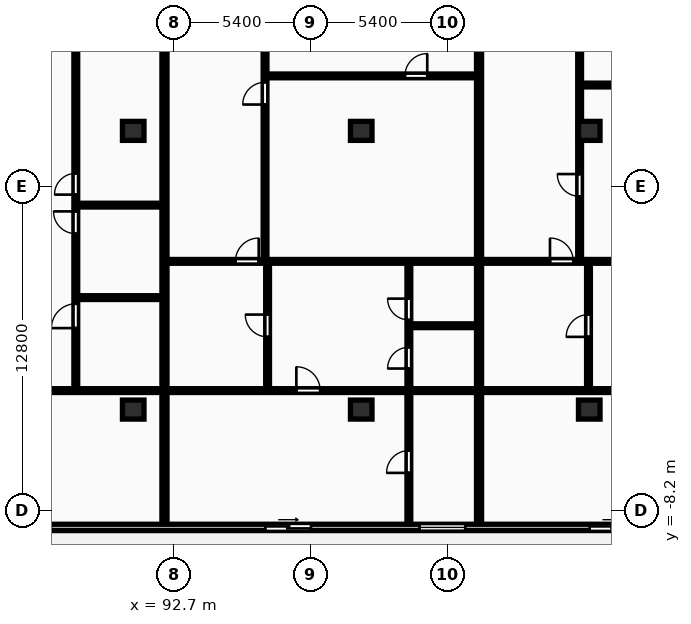
"""IFC4 building model, lengths in metres.
Left out: names, types, materials, properties, quantities, classifications, styles, units other than length and angle.
Written with IfcOpenShell. Run it as: python <this file> out.ifc"""

import sys

from ifc_helpers import new_model, si_unit, direction, frame, frame_2d, origin, origin_2d, place, context, subcontext, project, spatial, rectangle, extrude, element, fill, save


model = new_model("IFC4")
c1 = context("Model", 3, precision=1e-05, world=origin(), true_north=direction((0.0, 1.0)))
c2 = subcontext(c1, "Body", "Model", "MODEL_VIEW")
j1 = project(units=[si_unit("LENGTHUNIT", "METRE"), si_unit("PLANEANGLEUNIT", "RADIAN")], contexts=[c1])
p1 = place(None, origin())
s1 = spatial("IfcSite", under=j1, at=p1, CompositionType="ELEMENT")
p2 = place(p1, origin())
s2 = spatial("IfcBuilding", under=s1, at=p2, CompositionType="ELEMENT")
p3 = place(p2, frame((0.0, 0.0, 106.8)))
s3 = spatial("IfcBuildingStorey", under=s2, at=p3, CompositionType="ELEMENT", Elevation=106.8)
for number, where, z_axis, x_axis in (
    (1, (91.1, -4.2, 0.0), (0.0, 0.0, 1.0), (1.0, 0.0, 0.0)),
    (2, (91.1, 6.8, 0.0), (0.0, 0.0, 1.0), (1.0, 0.0, 0.0)),
    (3, (100.1, -4.2, 0.0), (0.0, 0.0, 1.0), (1.0, 0.0, 0.0)),
    (4, (100.1, 6.8, 0.0), (0.0, 0.0, 1.0), (1.0, 0.0, 0.0)),
    (5, (109.1, -4.2, 0.0), (0.0, 0.0, 1.0), (1.0, 0.0, 0.0)),
    (6, (109.1, 6.8, 0.0), (0.0, 0.0, 1.0), (1.0, 0.0, 0.0)),
):
    element("IfcColumn", number, at=place(p3, frame(where, z_axis=z_axis, x_axis=x_axis)), inside=s3, PredefinedType="COLUMN", context=c2, shape_type="SweptSolid", body=[
        extrude(rectangle(XDim=0.85, YDim=0.75, at=origin_2d()), origin(), (0.0, 0.0, 1.0), 3.25),
    ])
p4 = place(p3, frame((72.7, -8.85, 0.0), z_axis=(0.0, 0.0, 1.0), x_axis=(1.0, 0.0, 0.0)))
e7 = element("IfcWall", 7, at=p4, inside=s3, PredefinedType="STANDARD", context=c2, shape_type="SweptSolid", body=[
    extrude(rectangle(XDim=58.0, YDim=0.25, at=frame_2d((29.0, 0.0))), origin(), (0.0, 0.0, 1.0), 2.97),
])
p5 = place(p4, frame((3.358, 0.0, 0.0)))
e8 = element("IfcOpeningElement", 8, at=p5, cuts=e7, PredefinedType="OPENING", context=c2, shape_type="SweptSolid", body=[
    extrude(rectangle(XDim=1.8, YDim=2.2, at=frame_2d((0.9, 1.1))), frame((0.0, 0.135, 0.0), z_axis=(0.0, -1.0, 0.0), x_axis=(1.0, 0.0, 0.0)), (0.0, 0.0, 1.0), 0.27),
])
p6 = place(p4, frame((12.755, 0.0, 0.85)))
e9 = element("IfcOpeningElement", 9, at=p6, cuts=e7, PredefinedType="OPENING", context=c2, shape_type="SweptSolid", body=[
    extrude(rectangle(XDim=2.4, YDim=1.9, at=frame_2d((1.2, 0.95))), frame((0.0, 0.135, 0.0), z_axis=(0.0, -1.0, 0.0), x_axis=(1.0, 0.0, 0.0)), (0.0, 0.0, 1.0), 0.27),
])
p7 = place(p4, frame((23.617, 0.0, 0.0)))
e10 = element("IfcOpeningElement", 10, at=p7, cuts=e7, PredefinedType="OPENING", context=c2, shape_type="SweptSolid", body=[
    extrude(rectangle(XDim=1.8, YDim=2.2, at=frame_2d((0.9, 1.1))), frame((0.0, 0.135, 0.0), z_axis=(0.0, -1.0, 0.0), x_axis=(1.0, 0.0, 0.0)), (0.0, 0.0, 1.0), 0.27),
])
p8 = place(p4, frame((29.705, 0.0, 0.85)))
e11 = element("IfcOpeningElement", 11, at=p8, cuts=e7, PredefinedType="OPENING", context=c2, shape_type="SweptSolid", body=[
    extrude(rectangle(XDim=1.8, YDim=1.8, at=frame_2d((0.9, 0.9))), frame((0.0, 0.135, 0.0), z_axis=(0.0, -1.0, 0.0), x_axis=(1.0, 0.0, 0.0)), (0.0, 0.0, 1.0), 0.27),
])
p9 = place(p4, frame((36.417, 0.0, 0.0)))
e12 = element("IfcOpeningElement", 12, at=p9, cuts=e7, PredefinedType="OPENING", context=c2, shape_type="SweptSolid", body=[
    extrude(rectangle(XDim=1.8, YDim=2.2, at=frame_2d((0.9, 1.1))), frame((0.0, 0.135, 0.0), z_axis=(0.0, -1.0, 0.0), x_axis=(1.0, 0.0, 0.0)), (0.0, 0.0, 1.0), 0.27),
])
p10 = place(p4, frame((43.213, 0.0, 0.85)))
e13 = element("IfcOpeningElement", 13, at=p10, cuts=e7, PredefinedType="OPENING", context=c2, shape_type="SweptSolid", body=[
    extrude(rectangle(XDim=1.8, YDim=1.8, at=frame_2d((0.9, 0.9))), frame((0.0, 0.135, 0.0), z_axis=(0.0, -1.0, 0.0), x_axis=(1.0, 0.0, 0.0)), (0.0, 0.0, 1.0), 0.27),
])
p11 = place(p4, frame((49.262, 0.0, 0.0)))
e14 = element("IfcOpeningElement", 14, at=p11, cuts=e7, PredefinedType="OPENING", context=c2, shape_type="SweptSolid", body=[
    extrude(rectangle(XDim=1.8, YDim=2.2, at=frame_2d((0.9, 1.1))), frame((0.0, 0.135, 0.0), z_axis=(0.0, -1.0, 0.0), x_axis=(1.0, 0.0, 0.0)), (0.0, 0.0, 1.0), 0.27),
])
p12 = place(p4, frame((54.9, 0.0, 0.85)))
e15 = element("IfcOpeningElement", 15, at=p12, cuts=e7, PredefinedType="OPENING", context=c2, shape_type="SweptSolid", body=[
    extrude(rectangle(XDim=2.4, YDim=1.9, at=frame_2d((1.2, 0.95))), frame((0.0, 0.135, 0.0), z_axis=(0.0, -1.0, 0.0), x_axis=(1.0, 0.0, 0.0)), (0.0, 0.0, 1.0), 0.27),
])
p13 = place(p3, frame((92.333, -8.7, 0.0), z_axis=(0.0, 0.0, 1.0), x_axis=(0.0, 1.0, 0.0)))
e16 = element("IfcWall", 16, at=p13, inside=s3, PredefinedType="PARTITIONING", context=c2, shape_type="SweptSolid", body=[
    extrude(rectangle(XDim=24.57, YDim=0.2, at=frame_2d((12.285, 0.0))), origin(), (0.0, 0.0, 1.0), 2.97),
])
for number, where, z_axis, x_axis in (
    (17, (88.893, 0.22, 0.0), (0.0, 0.0, 1.0), (1.0, 0.0, 0.0)),
    (18, (88.893, 3.87, 0.0), (0.0, 0.0, 1.0), (1.0, 0.0, 0.0)),
):
    element("IfcWall", number, at=place(p3, frame(where, z_axis=z_axis, x_axis=x_axis)), inside=s3, PredefinedType="PARTITIONING", context=c2, shape_type="SweptSolid", body=[
        extrude(rectangle(XDim=3.36, YDim=0.15, at=frame_2d((1.68, 0.0))), origin(), (0.0, 0.0, 1.0), 2.97),
    ])
p14 = place(p3, frame((88.833, -3.39, 0.0), z_axis=(0.0, 0.0, 1.0), x_axis=(0.0, 1.0, 0.0)))
e19 = element("IfcWall", 19, at=p14, inside=s3, PredefinedType="PARTITIONING", context=c2, shape_type="SweptSolid", body=[
    extrude(rectangle(XDim=19.28, YDim=0.15, at=frame_2d((9.64, 0.0))), origin(), (0.0, 0.0, 1.0), 2.97),
])
p15 = place(p14, frame((2.406, 0.0, 0.0)))
e20 = element("IfcOpeningElement", 20, at=p15, cuts=e19, PredefinedType="OPENING", context=c2, shape_type="SweptSolid", body=[
    extrude(rectangle(XDim=0.96, YDim=2.1, at=frame_2d((0.48, 1.05))), frame((0.0, 0.085, 0.0), z_axis=(0.0, -1.0, 0.0), x_axis=(1.0, 0.0, 0.0)), (0.0, 0.0, 1.0), 0.17),
])
p16 = place(p14, frame((6.133, 0.0, 0.0)))
e21 = element("IfcOpeningElement", 21, at=p16, cuts=e19, PredefinedType="OPENING", context=c2, shape_type="SweptSolid", body=[
    extrude(rectangle(XDim=0.88, YDim=2.06, at=frame_2d((0.44, 1.03))), frame((0.0, 0.085, 0.0), z_axis=(0.0, -1.0, 0.0), x_axis=(1.0, 0.0, 0.0)), (0.0, 0.0, 1.0), 0.17),
])
p17 = place(p14, frame((7.674, 0.0, 0.0)))
e22 = element("IfcOpeningElement", 22, at=p17, cuts=e19, PredefinedType="OPENING", context=c2, shape_type="SweptSolid", body=[
    extrude(rectangle(XDim=0.84, YDim=2.04, at=frame_2d((0.42, 1.02))), frame((0.0, 0.085, 0.0), z_axis=(0.0, -1.0, 0.0), x_axis=(1.0, 0.0, 0.0)), (0.0, 0.0, 1.0), 0.17),
])
p18 = place(p3, frame((72.78, -3.45, 0.0), z_axis=(0.0, 0.0, 1.0), x_axis=(1.0, 0.0, 0.0)))
e23 = element("IfcWall", 23, at=p18, inside=s3, PredefinedType="PARTITIONING", context=c2, shape_type="SweptSolid", body=[
    extrude(rectangle(XDim=19.473, YDim=0.15, at=frame_2d((9.737, 0.0))), origin(), (0.0, 0.0, 1.0), 2.97),
])
p19 = place(p18, frame((6.714, 0.0, 0.0)))
e24 = element("IfcOpeningElement", 24, at=p19, cuts=e23, PredefinedType="OPENING", context=c2, shape_type="SweptSolid", body=[
    extrude(rectangle(XDim=0.94, YDim=2.1, at=frame_2d((0.47, 1.05))), frame((0.0, 0.085, 0.0), z_axis=(0.0, -1.0, 0.0), x_axis=(1.0, 0.0, 0.0)), (0.0, 0.0, 1.0), 0.17),
])
p20 = place(p18, frame((10.959, 0.0, 0.0)))
e25 = element("IfcOpeningElement", 25, at=p20, cuts=e23, PredefinedType="OPENING", context=c2, shape_type="SweptSolid", body=[
    extrude(rectangle(XDim=0.94, YDim=2.1, at=frame_2d((0.47, 1.05))), frame((0.0, 0.085, 0.0), z_axis=(0.0, -1.0, 0.0), x_axis=(1.0, 0.0, 0.0)), (0.0, 0.0, 1.0), 0.17),
])
p21 = place(p3, frame((104.75, -8.7, 0.0), z_axis=(0.0, 0.0, 1.0), x_axis=(0.0, 1.0, 0.0)))
e26 = element("IfcWall", 26, at=p21, inside=s3, PredefinedType="PARTITIONING", context=c2, shape_type="SweptSolid", body=[
    extrude(rectangle(XDim=24.57, YDim=0.2, at=frame_2d((12.285, 0.0))), origin(), (0.0, 0.0, 1.0), 2.97),
])
p22 = place(p3, frame((96.363, 8.97, 0.0), z_axis=(0.0, 0.0, 1.0), x_axis=(1.0, 0.0, 0.0)))
e27 = element("IfcWall", 27, at=p22, inside=s3, PredefinedType="PARTITIONING", context=c2, shape_type="SweptSolid", body=[
    extrude(rectangle(XDim=8.307, YDim=0.15, at=frame_2d((4.153, 0.0))), origin(), (0.0, 0.0, 1.0), 2.97),
])
p23 = place(p22, frame((5.462, 0.0, 0.0)))
e28 = element("IfcOpeningElement", 28, at=p23, cuts=e27, PredefinedType="OPENING", context=c2, shape_type="SweptSolid", body=[
    extrude(rectangle(XDim=0.88, YDim=2.06, at=frame_2d((0.44, 1.03))), frame((0.0, 0.085, 0.0), z_axis=(0.0, -1.0, 0.0), x_axis=(1.0, 0.0, 0.0)), (0.0, 0.0, 1.0), 0.17),
])
p24 = place(p3, frame((96.303, 1.69, 0.0), z_axis=(0.0, 0.0, 1.0), x_axis=(0.0, 1.0, 0.0)))
e29 = element("IfcWall", 29, at=p24, inside=s3, PredefinedType="PARTITIONING", context=c2, shape_type="SweptSolid", body=[
    extrude(rectangle(XDim=14.2, YDim=0.15, at=frame_2d((7.1, 0.0))), origin(), (0.0, 0.0, 1.0), 2.97),
])
p25 = place(p24, frame((6.15, 0.0, 0.0)))
e30 = element("IfcOpeningElement", 30, at=p25, cuts=e29, PredefinedType="OPENING", context=c2, shape_type="SweptSolid", body=[
    extrude(rectangle(XDim=0.88, YDim=2.06, at=frame_2d((0.44, 1.03))), frame((0.0, 0.085, 0.0), z_axis=(0.0, -1.0, 0.0), x_axis=(1.0, 0.0, 0.0)), (0.0, 0.0, 1.0), 0.17),
])
p26 = place(p3, frame((96.403, -3.39, 0.0), z_axis=(0.0, 0.0, 1.0), x_axis=(0.0, 1.0, 0.0)))
e31 = element("IfcWall", 31, at=p26, inside=s3, PredefinedType="PARTITIONING", context=c2, shape_type="SweptSolid", body=[
    extrude(rectangle(XDim=5.0, YDim=0.15, at=frame_2d((2.5, 0.0))), origin(), (0.0, 0.0, 1.0), 2.97),
])
p27 = place(p26, frame((2.06, 0.0, 0.0)))
e32 = element("IfcOpeningElement", 32, at=p27, cuts=e31, PredefinedType="OPENING", context=c2, shape_type="SweptSolid", body=[
    extrude(rectangle(XDim=0.88, YDim=2.06, at=frame_2d((0.44, 1.03))), frame((0.0, 0.085, 0.0), z_axis=(0.0, -1.0, 0.0), x_axis=(1.0, 0.0, 0.0)), (0.0, 0.0, 1.0), 0.17),
])
p28 = place(p3, frame((102.04, -0.89, 0.0), z_axis=(0.0, 0.0, 1.0), x_axis=(1.0, 0.0, 0.0)))
e33 = element("IfcWall", 33, at=p28, inside=s3, PredefinedType="PARTITIONING", context=c2, shape_type="SweptSolid", body=[
    extrude(rectangle(XDim=2.63, YDim=0.15, at=frame_2d((1.315, 0.0))), origin(), (0.0, 0.0, 1.0), 2.97),
])
p29 = place(p3, frame((101.98, -8.7, 0.0), z_axis=(0.0, 0.0, 1.0), x_axis=(0.0, 1.0, 0.0)))
e34 = element("IfcWall", 34, at=p29, inside=s3, PredefinedType="PARTITIONING", context=c2, shape_type="SweptSolid", body=[
    extrude(rectangle(XDim=10.31, YDim=0.15, at=frame_2d((5.155, 0.0))), origin(), (0.0, 0.0, 1.0), 2.97),
])
p30 = place(p29, frame((6.12, 0.0, 0.0)))
e35 = element("IfcOpeningElement", 35, at=p30, cuts=e34, PredefinedType="OPENING", context=c2, shape_type="SweptSolid", body=[
    extrude(rectangle(XDim=0.84, YDim=2.04, at=frame_2d((0.42, 1.02))), frame((0.0, 0.085, 0.0), z_axis=(0.0, -1.0, 0.0), x_axis=(1.0, 0.0, 0.0)), (0.0, 0.0, 1.0), 0.17),
])
p31 = place(p29, frame((8.04, 0.0, 0.0)))
e36 = element("IfcOpeningElement", 36, at=p31, cuts=e34, PredefinedType="OPENING", context=c2, shape_type="SweptSolid", body=[
    extrude(rectangle(XDim=0.84, YDim=2.04, at=frame_2d((0.42, 1.02))), frame((0.0, 0.085, 0.0), z_axis=(0.0, -1.0, 0.0), x_axis=(1.0, 0.0, 0.0)), (0.0, 0.0, 1.0), 0.17),
])
p32 = place(p29, frame((2.001, 0.0, 0.0)))
e37 = element("IfcOpeningElement", 37, at=p32, cuts=e34, PredefinedType="OPENING", context=c2, shape_type="SweptSolid", body=[
    extrude(rectangle(XDim=0.88, YDim=2.06, at=frame_2d((0.44, 1.03))), frame((0.0, 0.085, 0.0), z_axis=(0.0, -1.0, 0.0), x_axis=(1.0, 0.0, 0.0)), (0.0, 0.0, 1.0), 0.17),
])
p33 = place(p3, frame((92.413, 1.65, 0.0), z_axis=(0.0, 0.0, 1.0), x_axis=(1.0, 0.0, 0.0)))
e38 = element("IfcWall", 38, at=p33, inside=s3, PredefinedType="PARTITIONING", context=c2, shape_type="SweptSolid", body=[
    extrude(rectangle(XDim=12.257, YDim=0.15, at=frame_2d((6.128, 0.0))), origin(), (0.0, 0.0, 1.0), 2.97),
])
p34 = place(p33, frame((2.72, 0.0, 0.0)))
e39 = element("IfcOpeningElement", 39, at=p34, cuts=e38, PredefinedType="OPENING", context=c2, shape_type="SweptSolid", body=[
    extrude(rectangle(XDim=0.92, YDim=2.08, at=frame_2d((0.46, 1.04))), frame((0.0, 0.085, 0.0), z_axis=(0.0, -1.0, 0.0), x_axis=(1.0, 0.0, 0.0)), (0.0, 0.0, 1.0), 0.17),
])
p35 = place(p3, frame((92.413, -3.45, 0.0), z_axis=(0.0, 0.0, 1.0), x_axis=(1.0, 0.0, 0.0)))
e40 = element("IfcWall", 40, at=p35, inside=s3, PredefinedType="PARTITIONING", context=c2, shape_type="SweptSolid", body=[
    extrude(rectangle(XDim=12.257, YDim=0.15, at=frame_2d((6.128, 0.0))), origin(), (0.0, 0.0, 1.0), 2.97),
])
p36 = place(p35, frame((5.126, 0.0, 0.0)))
e41 = element("IfcOpeningElement", 41, at=p36, cuts=e40, PredefinedType="OPENING", context=c2, shape_type="SweptSolid", body=[
    extrude(rectangle(XDim=0.94, YDim=2.1, at=frame_2d((0.47, 1.05))), frame((0.0, 0.085, 0.0), z_axis=(0.0, -1.0, 0.0), x_axis=(1.0, 0.0, 0.0)), (0.0, 0.0, 1.0), 0.17),
])
p37 = place(p3, frame((108.78, 8.61, 0.0), z_axis=(0.0, 0.0, 1.0), x_axis=(1.0, 0.0, 0.0)))
e42 = element("IfcWall", 42, at=p37, inside=s3, PredefinedType="PARTITIONING", context=c2, shape_type="SweptSolid", body=[
    extrude(rectangle(XDim=9.723, YDim=0.15, at=frame_2d((4.862, 0.0))), origin(), (0.0, 0.0, 1.0), 2.97),
])
p38 = place(p37, frame((3.792, 0.0, 0.0)))
e43 = element("IfcOpeningElement", 43, at=p38, cuts=e42, PredefinedType="OPENING", context=c2, shape_type="SweptSolid", body=[
    extrude(rectangle(XDim=0.88, YDim=2.06, at=frame_2d((0.44, 1.03))), frame((0.0, 0.085, 0.0), z_axis=(0.0, -1.0, 0.0), x_axis=(1.0, 0.0, 0.0)), (0.0, 0.0, 1.0), 0.17),
])
p39 = place(p3, frame((108.72, 1.69, 0.0), z_axis=(0.0, 0.0, 1.0), x_axis=(0.0, 1.0, 0.0)))
e44 = element("IfcWall", 44, at=p39, inside=s3, PredefinedType="PARTITIONING", context=c2, shape_type="SweptSolid", body=[
    extrude(rectangle(XDim=14.2, YDim=0.15, at=frame_2d((7.1, 0.0))), origin(), (0.0, 0.0, 1.0), 2.97),
])
p40 = place(p39, frame((2.526, 0.0, 0.0)))
e45 = element("IfcOpeningElement", 45, at=p40, cuts=e44, PredefinedType="OPENING", context=c2, shape_type="SweptSolid", body=[
    extrude(rectangle(XDim=0.88, YDim=2.06, at=frame_2d((0.44, 1.03))), frame((0.0, 0.085, 0.0), z_axis=(0.0, -1.0, 0.0), x_axis=(1.0, 0.0, 0.0)), (0.0, 0.0, 1.0), 0.17),
])
p41 = place(p3, frame((109.07, -3.39, 0.0), z_axis=(0.0, 0.0, 1.0), x_axis=(0.0, 1.0, 0.0)))
e46 = element("IfcWall", 46, at=p41, inside=s3, PredefinedType="PARTITIONING", context=c2, shape_type="SweptSolid", body=[
    extrude(rectangle(XDim=5.0, YDim=0.15, at=frame_2d((2.5, 0.0))), origin(), (0.0, 0.0, 1.0), 2.2),
])
p42 = place(p41, frame((2.06, 0.0, 0.0)))
e47 = element("IfcOpeningElement", 47, at=p42, cuts=e46, PredefinedType="OPENING", context=c2, shape_type="SweptSolid", body=[
    extrude(rectangle(XDim=0.88, YDim=2.06, at=frame_2d((0.44, 1.03))), frame((0.0, 0.085, 0.0), z_axis=(0.0, -1.0, 0.0), x_axis=(1.0, 0.0, 0.0)), (0.0, 0.0, 1.0), 0.17),
])
p43 = place(p3, frame((104.83, 1.65, 0.0), z_axis=(0.0, 0.0, 1.0), x_axis=(1.0, 0.0, 0.0)))
e48 = element("IfcWall", 48, at=p43, inside=s3, PredefinedType="PARTITIONING", context=c2, shape_type="SweptSolid", body=[
    extrude(rectangle(XDim=13.673, YDim=0.15, at=frame_2d((6.837, 0.0))), origin(), (0.0, 0.0, 1.0), 2.97),
])
p44 = place(p43, frame((2.72, 0.0, 0.0)))
e49 = element("IfcOpeningElement", 49, at=p44, cuts=e48, PredefinedType="OPENING", context=c2, shape_type="SweptSolid", body=[
    extrude(rectangle(XDim=0.92, YDim=2.08, at=frame_2d((0.46, 1.04))), frame((0.0, 0.085, 0.0), z_axis=(0.0, -1.0, 0.0), x_axis=(1.0, 0.0, 0.0)), (0.0, 0.0, 1.0), 0.17),
])
p45 = place(p3, frame((104.83, -3.45, 0.0), z_axis=(0.0, 0.0, 1.0), x_axis=(1.0, 0.0, 0.0)))
e50 = element("IfcWall", 50, at=p45, inside=s3, PredefinedType="PARTITIONING", context=c2, shape_type="SweptSolid", body=[
    extrude(rectangle(XDim=13.673, YDim=0.15, at=frame_2d((6.837, 0.0))), origin(), (0.0, 0.0, 1.0), 2.97),
])
p46 = place(p45, frame((6.367, 0.0, 0.0)))
e51 = element("IfcOpeningElement", 51, at=p46, cuts=e50, PredefinedType="OPENING", context=c2, shape_type="SweptSolid", body=[
    extrude(rectangle(XDim=0.94, YDim=2.1, at=frame_2d((0.47, 1.05))), frame((0.0, 0.085, 0.0), z_axis=(0.0, -1.0, 0.0), x_axis=(1.0, 0.0, 0.0)), (0.0, 0.0, 1.0), 0.17),
])
p47 = place(p7, origin())
e52 = element("IfcDoor", 52, at=p47, inside=s3, OperationType="SLIDING_TO_RIGHT", PredefinedType="DOOR", context=c2, shape_type="SweptSolid", body=[
    extrude(rectangle(XDim=1.8, YDim=2.2, at=frame_2d((0.9, 1.1))), frame((0.0, 0.025, 0.0), z_axis=(0.0, -1.0, 0.0), x_axis=(1.0, 0.0, 0.0)), (0.0, 0.0, 1.0), 0.05),
])
fill(e10, e52)
p48 = place(p8, origin())
e53 = element("IfcWindow", 53, at=p48, inside=s3, PartitioningType="SINGLE_PANEL", PredefinedType="WINDOW", context=c2, shape_type="SweptSolid", body=[
    extrude(rectangle(XDim=1.8, YDim=1.8, at=frame_2d((0.9, 0.9))), frame((0.0, 0.03, 0.0), z_axis=(0.0, -1.0, 0.0), x_axis=(1.0, 0.0, 0.0)), (0.0, 0.0, 1.0), 0.06),
])
fill(e11, e53)
p49 = place(p9, origin())
e54 = element("IfcDoor", 54, at=p49, inside=s3, OperationType="SLIDING_TO_RIGHT", PredefinedType="DOOR", context=c2, shape_type="SweptSolid", body=[
    extrude(rectangle(XDim=1.8, YDim=2.2, at=frame_2d((0.9, 1.1))), frame((0.0, 0.025, 0.0), z_axis=(0.0, -1.0, 0.0), x_axis=(1.0, 0.0, 0.0)), (0.0, 0.0, 1.0), 0.05),
])
fill(e12, e54)
p50 = place(p15, origin())
e55 = element("IfcDoor", 55, at=p50, inside=s3, OperationType="SINGLE_SWING_LEFT", PredefinedType="DOOR", context=c2, shape_type="SweptSolid", body=[
    extrude(rectangle(XDim=0.96, YDim=2.1, at=frame_2d((0.48, 1.05))), frame((0.0, 0.025, 0.0), z_axis=(0.0, -1.0, 0.0), x_axis=(1.0, 0.0, 0.0)), (0.0, 0.0, 1.0), 0.05),
])
fill(e20, e55)
p51 = place(p16, origin())
e56 = element("IfcDoor", 56, at=p51, inside=s3, OperationType="SINGLE_SWING_RIGHT", PredefinedType="DOOR", context=c2, shape_type="SweptSolid", body=[
    extrude(rectangle(XDim=0.88, YDim=2.06, at=frame_2d((0.44, 1.03))), frame((0.0, 0.025, 0.0), z_axis=(0.0, -1.0, 0.0), x_axis=(1.0, 0.0, 0.0)), (0.0, 0.0, 1.0), 0.05),
])
fill(e21, e56)
p52 = place(p17, origin())
e57 = element("IfcDoor", 57, at=p52, inside=s3, OperationType="SINGLE_SWING_LEFT", PredefinedType="DOOR", context=c2, shape_type="SweptSolid", body=[
    extrude(rectangle(XDim=0.84, YDim=2.04, at=frame_2d((0.42, 1.02))), frame((0.0, 0.025, 0.0), z_axis=(0.0, -1.0, 0.0), x_axis=(1.0, 0.0, 0.0)), (0.0, 0.0, 1.0), 0.05),
])
fill(e22, e57)
p53 = place(p23, origin())
e58 = element("IfcDoor", 58, at=p53, inside=s3, OperationType="SINGLE_SWING_RIGHT", PredefinedType="DOOR", context=c2, shape_type="SweptSolid", body=[
    extrude(rectangle(XDim=0.88, YDim=2.06, at=frame_2d((0.44, 1.03))), frame((0.0, 0.025, 0.0), z_axis=(0.0, -1.0, 0.0), x_axis=(1.0, 0.0, 0.0)), (0.0, 0.0, 1.0), 0.05),
])
fill(e28, e58)
p54 = place(p25, origin())
e59 = element("IfcDoor", 59, at=p54, inside=s3, OperationType="SINGLE_SWING_LEFT", PredefinedType="DOOR", context=c2, shape_type="SweptSolid", body=[
    extrude(rectangle(XDim=0.88, YDim=2.06, at=frame_2d((0.44, 1.03))), frame((0.0, 0.025, 0.0), z_axis=(0.0, -1.0, 0.0), x_axis=(1.0, 0.0, 0.0)), (0.0, 0.0, 1.0), 0.05),
])
fill(e30, e59)
p55 = place(p27, origin())
e60 = element("IfcDoor", 60, at=p55, inside=s3, OperationType="SINGLE_SWING_RIGHT", PredefinedType="DOOR", context=c2, shape_type="SweptSolid", body=[
    extrude(rectangle(XDim=0.88, YDim=2.06, at=frame_2d((0.44, 1.03))), frame((0.0, 0.025, 0.0), z_axis=(0.0, -1.0, 0.0), x_axis=(1.0, 0.0, 0.0)), (0.0, 0.0, 1.0), 0.05),
])
fill(e32, e60)
p56 = place(p30, origin())
e61 = element("IfcDoor", 61, at=p56, inside=s3, OperationType="SINGLE_SWING_LEFT", PredefinedType="DOOR", context=c2, shape_type="SweptSolid", body=[
    extrude(rectangle(XDim=0.84, YDim=2.04, at=frame_2d((0.42, 1.02))), frame((0.0, 0.025, 0.0), z_axis=(0.0, -1.0, 0.0), x_axis=(1.0, 0.0, 0.0)), (0.0, 0.0, 1.0), 0.05),
])
fill(e35, e61)
p57 = place(p31, origin())
e62 = element("IfcDoor", 62, at=p57, inside=s3, OperationType="SINGLE_SWING_RIGHT", PredefinedType="DOOR", context=c2, shape_type="SweptSolid", body=[
    extrude(rectangle(XDim=0.84, YDim=2.04, at=frame_2d((0.42, 1.02))), frame((0.0, 0.025, 0.0), z_axis=(0.0, -1.0, 0.0), x_axis=(1.0, 0.0, 0.0)), (0.0, 0.0, 1.0), 0.05),
])
fill(e36, e62)
p58 = place(p32, origin())
e63 = element("IfcDoor", 63, at=p58, inside=s3, OperationType="SINGLE_SWING_LEFT", PredefinedType="DOOR", context=c2, shape_type="SweptSolid", body=[
    extrude(rectangle(XDim=0.88, YDim=2.06, at=frame_2d((0.44, 1.03))), frame((0.0, 0.025, 0.0), z_axis=(0.0, -1.0, 0.0), x_axis=(1.0, 0.0, 0.0)), (0.0, 0.0, 1.0), 0.05),
])
fill(e37, e63)
p59 = place(p34, origin())
e64 = element("IfcDoor", 64, at=p59, inside=s3, OperationType="SINGLE_SWING_RIGHT", PredefinedType="DOOR", context=c2, shape_type="SweptSolid", body=[
    extrude(rectangle(XDim=0.92, YDim=2.08, at=frame_2d((0.46, 1.04))), frame((0.0, 0.025, 0.0), z_axis=(0.0, -1.0, 0.0), x_axis=(1.0, 0.0, 0.0)), (0.0, 0.0, 1.0), 0.05),
])
fill(e39, e64)
p60 = place(p36, origin())
e65 = element("IfcDoor", 65, at=p60, inside=s3, OperationType="SINGLE_SWING_LEFT", PredefinedType="DOOR", context=c2, shape_type="SweptSolid", body=[
    extrude(rectangle(XDim=0.94, YDim=2.1, at=frame_2d((0.47, 1.05))), frame((0.0, 0.025, 0.0), z_axis=(0.0, -1.0, 0.0), x_axis=(1.0, 0.0, 0.0)), (0.0, 0.0, 1.0), 0.05),
])
fill(e41, e65)
p61 = place(p40, origin())
e66 = element("IfcDoor", 66, at=p61, inside=s3, OperationType="SINGLE_SWING_RIGHT", PredefinedType="DOOR", context=c2, shape_type="SweptSolid", body=[
    extrude(rectangle(XDim=0.88, YDim=2.06, at=frame_2d((0.44, 1.03))), frame((0.0, 0.025, 0.0), z_axis=(0.0, -1.0, 0.0), x_axis=(1.0, 0.0, 0.0)), (0.0, 0.0, 1.0), 0.05),
])
fill(e45, e66)
p62 = place(p42, origin())
e67 = element("IfcDoor", 67, at=p62, inside=s3, OperationType="SINGLE_SWING_LEFT", PredefinedType="DOOR", context=c2, shape_type="SweptSolid", body=[
    extrude(rectangle(XDim=0.88, YDim=2.06, at=frame_2d((0.44, 1.03))), frame((0.0, 0.025, 0.0), z_axis=(0.0, -1.0, 0.0), x_axis=(1.0, 0.0, 0.0)), (0.0, 0.0, 1.0), 0.05),
])
fill(e47, e67)
p63 = place(p44, origin())
e68 = element("IfcDoor", 68, at=p63, inside=s3, OperationType="SINGLE_SWING_LEFT", PredefinedType="DOOR", context=c2, shape_type="SweptSolid", body=[
    extrude(rectangle(XDim=0.92, YDim=2.08, at=frame_2d((0.46, 1.04))), frame((0.0, 0.025, 0.0), z_axis=(0.0, -1.0, 0.0), x_axis=(1.0, 0.0, 0.0)), (0.0, 0.0, 1.0), 0.05),
])
fill(e49, e68)
save(model, sys.argv[1])
